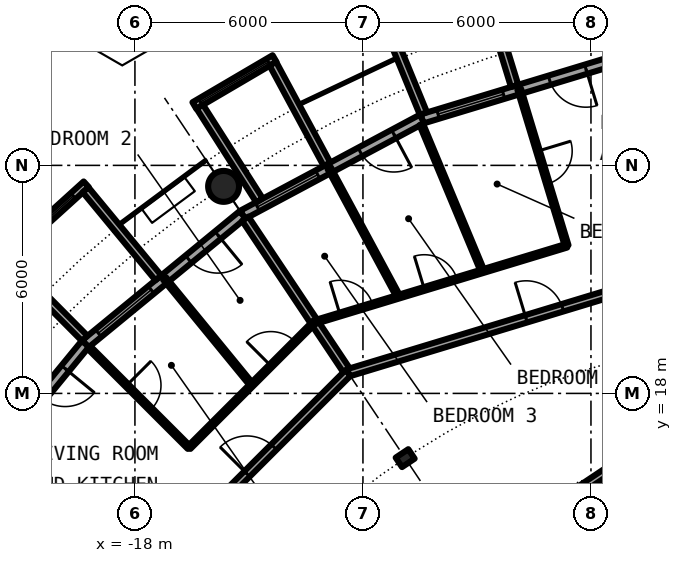
"""IFC4 building model, lengths in metres.
Left out: names, types, materials, properties, quantities, classifications, styles, units other than length and angle.
Written with IfcOpenShell. Run it as: python <this file> out.ifc"""

import sys

from ifc_helpers import new_model, si_unit, direction, frame, frame_2d, origin, origin_2d, place, context, subcontext, project, spatial, rectangle, circle, hollow_circle, i_section, extrude, element, fill, save


model = new_model("IFC4")
c1 = context("Model", 3, precision=1e-05, world=origin(), true_north=direction((0.0, 1.0)))
c2 = subcontext(c1, "Body", "Model", "MODEL_VIEW")
j1 = project(units=[si_unit("LENGTHUNIT", "METRE"), si_unit("PLANEANGLEUNIT", "RADIAN")], contexts=[c1])
p1 = place(None, origin())
s1 = spatial("IfcSite", under=j1, at=p1, CompositionType="ELEMENT")
p2 = place(p1, origin())
s2 = spatial("IfcBuilding", under=s1, at=p2, CompositionType="ELEMENT")
p3 = place(p2, frame((0.0, 0.0, 196.3)))
s3 = spatial("IfcBuildingStorey", under=s2, at=p3, CompositionType="ELEMENT", Elevation=196.3)
p4 = place(p3, frame((-15.667, 23.448, 0.0), z_axis=(0.0, 0.0, 1.0), x_axis=(1.0, 0.0, 0.0)))
e1 = element("IfcColumn", 1, at=p4, inside=s3, PredefinedType="COLUMN", context=c2, shape_type="SweptSolid", body=[
    extrude(hollow_circle(Radius=0.406, WallThickness=0.03, at=origin_2d()), origin(), (0.0, 0.0, 1.0), 3.05),
])
p5 = place(p3, frame((-10.889, 16.297, 0.0), z_axis=(0.0, 0.0, 1.0), x_axis=(-0.55557023302, 0.831469612303, 0.0)))
e2 = element("IfcColumn", 2, at=p5, inside=s3, PredefinedType="COLUMN", context=c2, shape_type="SweptSolid", body=[
    extrude(i_section(OverallWidth=0.3, OverallDepth=0.4, WebThickness=0.013, FlangeThickness=0.024, FilletRadius=0.027, at=origin_2d()), origin(), (0.0, 0.0, 1.0), 3.05),
])
p6 = place(p3, frame((-5.326, 26.775, 0.0), z_axis=(0.0, 0.0, 1.0), x_axis=(-0.956965678721, -0.290201119486, 0.0)))
e3 = element("IfcWall", 3, at=p6, inside=s3, PredefinedType="SOLIDWALL", context=c2, shape_type="SweptSolid", body=[
    extrude(rectangle(XDim=5.351, YDim=0.25, at=frame_2d((2.676, 0.0))), origin(), (0.0, 0.0, 1.0), 2.7),
])
p7 = place(p6, frame((0.841, 0.0, 0.0)))
e4 = element("IfcOpeningElement", 4, at=p7, cuts=e3, PredefinedType="OPENING", context=c2, shape_type="SweptSolid", body=[
    extrude(rectangle(XDim=1.0, YDim=2.2, at=frame_2d((0.5, 1.1))), frame((0.0, 0.135, 0.0), z_axis=(0.0, -1.0, 0.0), x_axis=(1.0, 0.0, 0.0)), (0.0, 0.0, 1.0), 0.27),
])
p8 = place(p6, frame((3.111, 0.0, 0.3)))
e5 = element("IfcOpeningElement", 5, at=p8, cuts=e3, PredefinedType="OPENING", context=c2, shape_type="SweptSolid", body=[
    extrude(rectangle(XDim=1.8, YDim=2.1, at=frame_2d((0.9, 1.05))), frame((0.0, 0.135, 0.0), z_axis=(0.0, -1.0, 0.0), x_axis=(1.0, 0.0, 0.0)), (0.0, 0.0, 1.0), 0.27),
])
p9 = place(p3, frame((-8.009, 26.092, -0.03), z_axis=(0.0, 0.0, 1.0), x_axis=(-0.293406695073, 0.955987715029, 0.0)))
e6 = element("IfcWall", 6, at=p9, inside=s3, PredefinedType="SOLIDWALL", context=c2, shape_type="SweptSolid", body=[
    extrude(rectangle(XDim=3.006, YDim=0.2, at=frame_2d((1.503, 0.0))), origin(), (0.0, 0.0, 1.0), 2.73),
])
p10 = place(p3, frame((-10.409, 25.364, -0.03), z_axis=(0.0, 0.0, 1.0), x_axis=(-0.379509886562, 0.925187681501, 0.0)))
e7 = element("IfcWall", 7, at=p10, inside=s3, PredefinedType="SOLIDWALL", context=c2, shape_type="SweptSolid", body=[
    extrude(rectangle(XDim=2.883, YDim=0.2, at=frame_2d((1.441, 0.0))), origin(), (0.0, 0.0, 1.0), 2.73),
])
p11 = place(p3, frame((-10.447, 25.222, 0.0), z_axis=(0.0, 0.0, 1.0), x_axis=(-0.881915646801, -0.471407246368, 0.0)))
e8 = element("IfcWall", 8, at=p11, inside=s3, PredefinedType="SOLIDWALL", context=c2, shape_type="SweptSolid", body=[
    extrude(rectangle(XDim=5.352, YDim=0.25, at=frame_2d((2.676, 0.0))), origin(), (0.0, 0.0, 1.0), 2.7),
])
p12 = place(p11, frame((0.841, 0.0, 0.0)))
e9 = element("IfcOpeningElement", 9, at=p12, cuts=e8, PredefinedType="OPENING", context=c2, shape_type="SweptSolid", body=[
    extrude(rectangle(XDim=1.0, YDim=2.2, at=frame_2d((0.5, 1.1))), frame((0.0, 0.135, 0.0), z_axis=(0.0, -1.0, 0.0), x_axis=(1.0, 0.0, 0.0)), (0.0, 0.0, 1.0), 0.27),
])
p13 = place(p11, frame((3.111, 0.0, 0.3)))
e10 = element("IfcOpeningElement", 10, at=p13, cuts=e8, PredefinedType="OPENING", context=c2, shape_type="SweptSolid", body=[
    extrude(rectangle(XDim=1.8, YDim=2.1, at=frame_2d((0.9, 1.05))), frame((0.0, 0.135, 0.0), z_axis=(0.0, -1.0, 0.0), x_axis=(1.0, 0.0, 0.0)), (0.0, 0.0, 1.0), 0.27),
])
p14 = place(p3, frame((-14.327, 26.812, -0.03), z_axis=(0.0, 0.0, 1.0), x_axis=(-0.862403467503, -0.506221551535, 0.0)))
e11 = element("IfcWall", 11, at=p14, inside=s3, PredefinedType="SOLIDWALL", context=c2, shape_type="SweptSolid", body=[
    extrude(rectangle(XDim=2.446, YDim=0.2, at=frame_2d((1.223, 0.0))), origin(), (0.0, 0.0, 1.0), 2.73),
])
p15 = place(p14, frame((0.183, 0.0, 0.33)))
e12 = element("IfcOpeningElement", 12, at=p15, cuts=e11, PredefinedType="OPENING", context=c2, shape_type="SweptSolid", body=[
    extrude(circle(Radius=1.04, at=frame_2d((1.04, 1.04))), frame((0.0, 0.11, 0.0), z_axis=(0.0, -1.0, 0.0), x_axis=(1.0, 0.0, 0.0)), (0.0, 0.0, 1.0), 0.22),
])
p16 = place(p3, frame((-12.945, 24.029, -0.03), z_axis=(0.0, 0.0, 1.0), x_axis=(-0.474424310775, 0.88029629861, 0.0)))
e13 = element("IfcWall", 13, at=p16, inside=s3, PredefinedType="SOLIDWALL", context=c2, shape_type="SweptSolid", body=[
    extrude(rectangle(XDim=3.006, YDim=0.2, at=frame_2d((1.503, 0.0))), origin(), (0.0, 0.0, 1.0), 2.73),
])
p17 = place(p3, frame((-14.722, 23.079, -0.03), z_axis=(0.0, 0.0, 1.0), x_axis=(-0.537572179146, 0.843217737129, 0.0)))
e14 = element("IfcWall", 14, at=p17, inside=s3, PredefinedType="SOLIDWALL", context=c2, shape_type="SweptSolid", body=[
    extrude(rectangle(XDim=2.924, YDim=0.2, at=frame_2d((1.462, 0.0))), origin(), (0.0, 0.0, 1.0), 2.73),
])
p18 = place(p3, frame((-15.167, 22.699, 0.0), z_axis=(0.0, 0.0, 1.0), x_axis=(-0.773019449054, -0.634382322723, 0.0)))
e15 = element("IfcWall", 15, at=p18, inside=s3, PredefinedType="SOLIDWALL", context=c2, shape_type="SweptSolid", body=[
    extrude(rectangle(XDim=5.352, YDim=0.25, at=frame_2d((2.676, 0.0))), origin(), (0.0, 0.0, 1.0), 2.7),
])
p19 = place(p18, frame((0.841, 0.0, 0.0)))
e16 = element("IfcOpeningElement", 16, at=p19, cuts=e15, PredefinedType="OPENING", context=c2, shape_type="SweptSolid", body=[
    extrude(rectangle(XDim=1.0, YDim=2.2, at=frame_2d((0.5, 1.1))), frame((0.0, 0.135, 0.0), z_axis=(0.0, -1.0, 0.0), x_axis=(1.0, 0.0, 0.0)), (0.0, 0.0, 1.0), 0.27),
])
p20 = place(p18, frame((3.111, 0.0, 0.3)))
e17 = element("IfcOpeningElement", 17, at=p20, cuts=e15, PredefinedType="OPENING", context=c2, shape_type="SweptSolid", body=[
    extrude(rectangle(XDim=1.8, YDim=2.1, at=frame_2d((0.9, 1.05))), frame((0.0, 0.135, 0.0), z_axis=(0.0, -1.0, 0.0), x_axis=(1.0, 0.0, 0.0)), (0.0, 0.0, 1.0), 0.27),
])
p21 = place(p3, frame((-19.282, 23.503, -0.03), z_axis=(0.0, 0.0, 1.0), x_axis=(-0.740998365753, -0.671506829416, 0.0)))
e18 = element("IfcWall", 18, at=p21, inside=s3, PredefinedType="SOLIDWALL", context=c2, shape_type="SweptSolid", body=[
    extrude(rectangle(XDim=2.993, YDim=0.2, at=frame_2d((1.497, 0.0))), origin(), (0.0, 0.0, 1.0), 2.73),
])
p22 = place(p21, frame((0.457, 0.0, 0.33)))
e19 = element("IfcOpeningElement", 19, at=p22, cuts=e18, PredefinedType="OPENING", context=c2, shape_type="SweptSolid", body=[
    extrude(circle(Radius=1.04, at=frame_2d((1.04, 1.04))), frame((0.0, 0.11, 0.0), z_axis=(0.0, -1.0, 0.0), x_axis=(1.0, 0.0, 0.0)), (0.0, 0.0, 1.0), 0.22),
])
p23 = place(p3, frame((-17.384, 21.041, -0.03), z_axis=(0.0, 0.0, 1.0), x_axis=(-0.63709551667, 0.770784861449, 0.0)))
e20 = element("IfcWall", 20, at=p23, inside=s3, PredefinedType="SOLIDWALL", context=c2, shape_type="SweptSolid", body=[
    extrude(rectangle(XDim=3.006, YDim=0.2, at=frame_2d((1.503, 0.0))), origin(), (0.0, 0.0, 1.0), 2.73),
])
p24 = place(p3, frame((-19.323, 19.45, -0.03), z_axis=(0.0, 0.0, 1.0), x_axis=(-0.704476739375, 0.709727076896, 0.0)))
e21 = element("IfcWall", 21, at=p24, inside=s3, PredefinedType="SOLIDWALL", context=c2, shape_type="SweptSolid", body=[
    extrude(rectangle(XDim=2.883, YDim=0.2, at=frame_2d((1.441, 0.0))), origin(), (0.0, 0.0, 1.0), 2.73),
])
p25 = place(p3, frame((-19.304, 19.304, 0.0), z_axis=(0.0, 0.0, 1.0), x_axis=(-0.634382322723, -0.773019449054, 0.0)))
e22 = element("IfcWall", 22, at=p25, inside=s3, PredefinedType="SOLIDWALL", context=c2, shape_type="SweptSolid", body=[
    extrude(rectangle(XDim=5.352, YDim=0.25, at=frame_2d((2.676, 0.0))), origin(), (0.0, 0.0, 1.0), 2.7),
])
p26 = place(p25, frame((0.841, 0.0, 0.0)))
e23 = element("IfcOpeningElement", 23, at=p26, cuts=e22, PredefinedType="OPENING", context=c2, shape_type="SweptSolid", body=[
    extrude(rectangle(XDim=1.0, YDim=2.2, at=frame_2d((0.5, 1.1))), frame((0.0, 0.135, 0.0), z_axis=(0.0, -1.0, 0.0), x_axis=(1.0, 0.0, 0.0)), (0.0, 0.0, 1.0), 0.27),
])
p27 = place(p25, frame((3.111, 0.0, 0.3)))
e24 = element("IfcOpeningElement", 24, at=p27, cuts=e22, PredefinedType="OPENING", context=c2, shape_type="SweptSolid", body=[
    extrude(rectangle(XDim=1.8, YDim=2.1, at=frame_2d((0.9, 1.05))), frame((0.0, 0.135, 0.0), z_axis=(0.0, -1.0, 0.0), x_axis=(1.0, 0.0, 0.0)), (0.0, 0.0, 1.0), 0.27),
])
p28 = place(p3, frame((-19.216, 19.216, 0.0), z_axis=(0.0, 0.0, 1.0), x_axis=(0.707106781187, -0.707106781187, 0.0)))
e25 = element("IfcWall", 25, at=p28, inside=s3, PredefinedType="PARTITIONING", context=c2, shape_type="SweptSolid", body=[
    extrude(rectangle(XDim=3.735, YDim=0.1, at=frame_2d((1.868, 0.0))), origin(), (0.0, 0.0, 1.0), 2.7),
])
p29 = place(p28, frame((1.417, 0.0, 0.0)))
e26 = element("IfcOpeningElement", 26, at=p29, cuts=e25, PredefinedType="OPENING", context=c2, shape_type="SweptSolid", body=[
    extrude(rectangle(XDim=0.9, YDim=2.3, at=frame_2d((0.45, 1.15))), frame((0.0, 0.06, 0.0), z_axis=(0.0, -1.0, 0.0), x_axis=(1.0, 0.0, 0.0)), (0.0, 0.0, 1.0), 0.12),
])
p30 = place(p3, frame((-17.22, 21.023, 0.0), z_axis=(0.0, 0.0, 1.0), x_axis=(0.633737383709, -0.773548271597, 0.0)))
e27 = element("IfcWall", 27, at=p30, inside=s3, PredefinedType="PARTITIONING", context=c2, shape_type="SweptSolid", body=[
    extrude(rectangle(XDim=3.618, YDim=0.1, at=frame_2d((1.809, 0.0))), origin(), (0.0, 0.0, 1.0), 2.7),
])
p31 = place(p3, frame((-15.097, 22.596, 0.0), z_axis=(0.0, 0.0, 1.0), x_axis=(0.555462686211, -0.831541462723, 0.0)))
e28 = element("IfcWall", 28, at=p31, inside=s3, PredefinedType="PARTITIONING", context=c2, shape_type="SweptSolid", body=[
    extrude(rectangle(XDim=4.875, YDim=0.2, at=frame_2d((2.438, 0.0))), origin(), (0.0, 0.0, 1.0), 2.7),
])
p32 = place(p3, frame((-12.887, 23.925, 0.0), z_axis=(0.0, 0.0, 1.0), x_axis=(0.474281720599, -0.88037313084, 0.0)))
e29 = element("IfcWall", 29, at=p32, inside=s3, PredefinedType="PARTITIONING", context=c2, shape_type="SweptSolid", body=[
    extrude(rectangle(XDim=3.842, YDim=0.1, at=frame_2d((1.921, 0.0))), origin(), (0.0, 0.0, 1.0), 2.7),
])
p33 = place(p3, frame((-10.465, 25.079, 0.0), z_axis=(0.0, 0.0, 1.0), x_axis=(0.385232176411, -0.922819684585, 0.0)))
e30 = element("IfcWall", 30, at=p33, inside=s3, PredefinedType="PARTITIONING", context=c2, shape_type="SweptSolid", body=[
    extrude(rectangle(XDim=4.187, YDim=0.1, at=frame_2d((2.094, 0.0))), origin(), (0.0, 0.0, 1.0), 2.7),
])
p34 = place(p3, frame((-7.888, 26.005, 0.0), z_axis=(0.0, 0.0, 1.0), x_axis=(0.290193157742, -0.956968093094, 0.0)))
e31 = element("IfcWall", 31, at=p34, inside=s3, PredefinedType="PARTITIONING", context=c2, shape_type="SweptSolid", body=[
    extrude(rectangle(XDim=4.304, YDim=0.1, at=frame_2d((2.152, 0.0))), origin(), (0.0, 0.0, 1.0), 2.7),
])
p35 = place(p34, frame((1.702, 0.0, 0.0)))
e32 = element("IfcOpeningElement", 32, at=p35, cuts=e31, PredefinedType="OPENING", context=c2, shape_type="SweptSolid", body=[
    extrude(rectangle(XDim=0.9, YDim=2.3, at=frame_2d((0.45, 1.15))), frame((0.0, 0.06, 0.0), z_axis=(0.0, -1.0, 0.0), x_axis=(1.0, 0.0, 0.0)), (0.0, 0.0, 1.0), 0.12),
])
p36 = place(p3, frame((-14.718, 9.832, 0.0), z_axis=(0.0, 0.0, 1.0), x_axis=(0.831437137577, 0.555618831806, 0.0)))
e33 = element("IfcWall", 33, at=p36, inside=s3, PredefinedType="PARTITIONING", context=c2, shape_type="SweptSolid", body=[
    extrude(rectangle(XDim=13.549, YDim=0.2, at=frame_2d((6.774, 0.0))), origin(), (0.0, 0.0, 1.0), 2.7),
])
p37 = place(p36, frame((7.968, 0.0, 0.0)))
e34 = element("IfcOpeningElement", 34, at=p37, cuts=e33, PredefinedType="OPENING", context=c2, shape_type="SweptSolid", body=[
    extrude(rectangle(XDim=1.0, YDim=2.3, at=frame_2d((0.5, 1.15))), frame((0.0, 0.11, 0.0), z_axis=(0.0, -1.0, 0.0), x_axis=(1.0, 0.0, 0.0)), (0.0, 0.0, 1.0), 0.22),
])
p38 = place(p3, frame((-12.389, 18.542, 0.0), z_axis=(0.0, 0.0, 1.0), x_axis=(0.956942051091, 0.290279022415, 0.0)))
e35 = element("IfcWall", 35, at=p38, inside=s3, PredefinedType="PARTITIONING", context=c2, shape_type="SweptSolid", body=[
    extrude(rectangle(XDim=12.946, YDim=0.2, at=frame_2d((6.473, 0.0))), origin(), (0.0, 0.0, 1.0), 2.7),
])
p39 = place(p38, frame((4.895, 0.0, 0.0)))
e36 = element("IfcOpeningElement", 36, at=p39, cuts=e35, PredefinedType="OPENING", context=c2, shape_type="SweptSolid", body=[
    extrude(rectangle(XDim=1.0, YDim=2.3, at=frame_2d((0.5, 1.15))), frame((0.0, 0.11, 0.0), z_axis=(0.0, -1.0, 0.0), x_axis=(1.0, 0.0, 0.0)), (0.0, 0.0, 1.0), 0.22),
])
p40 = place(p3, frame((-18.542, 12.389, 0.0), z_axis=(0.0, 0.0, 1.0), x_axis=(0.707106781187, 0.707106781187, 0.0)))
e37 = element("IfcWall", 37, at=p40, inside=s3, PredefinedType="PARTITIONING", context=c2, shape_type="SweptSolid", body=[
    extrude(rectangle(XDim=8.702, YDim=0.2, at=frame_2d((4.351, 0.0))), origin(), (0.0, 0.0, 1.0), 2.7),
])
p41 = place(p40, frame((4.938, 0.0, 0.0)))
e38 = element("IfcOpeningElement", 38, at=p41, cuts=e37, PredefinedType="OPENING", context=c2, shape_type="SweptSolid", body=[
    extrude(rectangle(XDim=1.0, YDim=2.3, at=frame_2d((0.5, 1.15))), frame((0.0, 0.11, 0.0), z_axis=(0.0, -1.0, 0.0), x_axis=(1.0, 0.0, 0.0)), (0.0, 0.0, 1.0), 0.22),
])
p42 = place(p3, frame((-13.281, 19.871, 0.0), z_axis=(0.0, 0.0, 1.0), x_axis=(0.956938868877, 0.290289512785, 0.0)))
e39 = element("IfcWall", 39, at=p42, inside=s3, PredefinedType="PARTITIONING", context=c2, shape_type="SweptSolid", body=[
    extrude(rectangle(XDim=6.941, YDim=0.1, at=frame_2d((3.47, 0.0))), origin(), (0.0, 0.0, 1.0), 2.7),
])
p43 = place(p42, frame((3.025, 0.0, 0.0)))
e40 = element("IfcOpeningElement", 40, at=p43, cuts=e39, PredefinedType="OPENING", context=c2, shape_type="SweptSolid", body=[
    extrude(rectangle(XDim=0.9, YDim=2.3, at=frame_2d((0.45, 1.15))), frame((0.0, 0.06, 0.0), z_axis=(0.0, -1.0, 0.0), x_axis=(1.0, 0.0, 0.0)), (0.0, 0.0, 1.0), 0.12),
])
p44 = place(p42, frame((0.708, 0.0, 0.0)))
e41 = element("IfcOpeningElement", 41, at=p44, cuts=e39, PredefinedType="OPENING", context=c2, shape_type="SweptSolid", body=[
    extrude(rectangle(XDim=0.9, YDim=2.3, at=frame_2d((0.45, 1.15))), frame((0.0, 0.06, 0.0), z_axis=(0.0, -1.0, 0.0), x_axis=(1.0, 0.0, 0.0)), (0.0, 0.0, 1.0), 0.12),
])
p45 = place(p3, frame((-16.575, 16.575, 0.0), z_axis=(0.0, 0.0, 1.0), x_axis=(0.707080600289, 0.707132961115, 0.0)))
e42 = element("IfcWall", 42, at=p45, inside=s3, PredefinedType="PARTITIONING", context=c2, shape_type="SweptSolid", body=[
    extrude(rectangle(XDim=4.663, YDim=0.1, at=frame_2d((2.331, 0.0))), origin(), (0.0, 0.0, 1.0), 2.7),
])
p46 = place(p45, frame((3.043, 0.0, 0.0)))
e43 = element("IfcOpeningElement", 43, at=p46, cuts=e42, PredefinedType="OPENING", context=c2, shape_type="SweptSolid", body=[
    extrude(rectangle(XDim=0.9, YDim=2.3, at=frame_2d((0.45, 1.15))), frame((0.0, 0.06, 0.0), z_axis=(0.0, -1.0, 0.0), x_axis=(1.0, 0.0, 0.0)), (0.0, 0.0, 1.0), 0.12),
])
p47 = place(p7, origin())
e44 = element("IfcDoor", 44, at=p47, inside=s3, OperationType="SINGLE_SWING_LEFT", PredefinedType="DOOR", context=c2, shape_type="SweptSolid", body=[
    extrude(rectangle(XDim=1.0, YDim=2.2, at=frame_2d((0.5, 1.1))), frame((0.0, 0.025, 0.0), z_axis=(0.0, -1.0, 0.0), x_axis=(1.0, 0.0, 0.0)), (0.0, 0.0, 1.0), 0.05),
])
fill(e4, e44)
p48 = place(p8, origin())
e45 = element("IfcWindow", 45, at=p48, inside=s3, PartitioningType="SINGLE_PANEL", PredefinedType="WINDOW", context=c2, shape_type="SweptSolid", body=[
    extrude(rectangle(XDim=1.8, YDim=2.1, at=frame_2d((0.9, 1.05))), frame((0.0, 0.03, 0.0), z_axis=(0.0, -1.0, 0.0), x_axis=(1.0, 0.0, 0.0)), (0.0, 0.0, 1.0), 0.06),
])
fill(e5, e45)
p49 = place(p12, origin())
e46 = element("IfcDoor", 46, at=p49, inside=s3, OperationType="SINGLE_SWING_LEFT", PredefinedType="DOOR", context=c2, shape_type="SweptSolid", body=[
    extrude(rectangle(XDim=1.0, YDim=2.2, at=frame_2d((0.5, 1.1))), frame((0.0, 0.025, 0.0), z_axis=(0.0, -1.0, 0.0), x_axis=(1.0, 0.0, 0.0)), (0.0, 0.0, 1.0), 0.05),
])
fill(e9, e46)
p50 = place(p13, origin())
e47 = element("IfcWindow", 47, at=p50, inside=s3, PartitioningType="SINGLE_PANEL", PredefinedType="WINDOW", context=c2, shape_type="SweptSolid", body=[
    extrude(rectangle(XDim=1.8, YDim=2.1, at=frame_2d((0.9, 1.05))), frame((0.0, 0.03, 0.0), z_axis=(0.0, -1.0, 0.0), x_axis=(1.0, 0.0, 0.0)), (0.0, 0.0, 1.0), 0.06),
])
fill(e10, e47)
p51 = place(p15, origin())
e48 = element("IfcWindow", 48, at=p51, inside=s3, PartitioningType="SINGLE_PANEL", PredefinedType="WINDOW", context=c2, shape_type="SweptSolid", body=[
    extrude(circle(Radius=1.04, at=frame_2d((1.04, 1.04))), frame((0.0, 0.03, 0.0), z_axis=(0.0, -1.0, 0.0), x_axis=(1.0, 0.0, 0.0)), (0.0, 0.0, 1.0), 0.06),
])
fill(e12, e48)
p52 = place(p19, origin())
e49 = element("IfcDoor", 49, at=p52, inside=s3, OperationType="SINGLE_SWING_LEFT", PredefinedType="DOOR", context=c2, shape_type="SweptSolid", body=[
    extrude(rectangle(XDim=1.0, YDim=2.2, at=frame_2d((0.5, 1.1))), frame((0.0, 0.025, 0.0), z_axis=(0.0, -1.0, 0.0), x_axis=(1.0, 0.0, 0.0)), (0.0, 0.0, 1.0), 0.05),
])
fill(e16, e49)
p53 = place(p20, origin())
e50 = element("IfcWindow", 50, at=p53, inside=s3, PartitioningType="SINGLE_PANEL", PredefinedType="WINDOW", context=c2, shape_type="SweptSolid", body=[
    extrude(rectangle(XDim=1.8, YDim=2.1, at=frame_2d((0.9, 1.05))), frame((0.0, 0.03, 0.0), z_axis=(0.0, -1.0, 0.0), x_axis=(1.0, 0.0, 0.0)), (0.0, 0.0, 1.0), 0.06),
])
fill(e17, e50)
p54 = place(p22, origin())
e51 = element("IfcWindow", 51, at=p54, inside=s3, PartitioningType="SINGLE_PANEL", PredefinedType="WINDOW", context=c2, shape_type="SweptSolid", body=[
    extrude(circle(Radius=1.04, at=frame_2d((1.04, 1.04))), frame((0.0, 0.03, 0.0), z_axis=(0.0, -1.0, 0.0), x_axis=(1.0, 0.0, 0.0)), (0.0, 0.0, 1.0), 0.06),
])
fill(e19, e51)
p55 = place(p26, origin())
e52 = element("IfcDoor", 52, at=p55, inside=s3, OperationType="SINGLE_SWING_LEFT", PredefinedType="DOOR", context=c2, shape_type="SweptSolid", body=[
    extrude(rectangle(XDim=1.0, YDim=2.2, at=frame_2d((0.5, 1.1))), frame((0.0, 0.025, 0.0), z_axis=(0.0, -1.0, 0.0), x_axis=(1.0, 0.0, 0.0)), (0.0, 0.0, 1.0), 0.05),
])
fill(e23, e52)
p56 = place(p39, origin())
e53 = element("IfcDoor", 53, at=p56, inside=s3, OperationType="SINGLE_SWING_LEFT", PredefinedType="DOOR", context=c2, shape_type="SweptSolid", body=[
    extrude(rectangle(XDim=1.0, YDim=2.3, at=frame_2d((0.5, 1.15))), frame((0.0, 0.025, 0.0), z_axis=(0.0, -1.0, 0.0), x_axis=(1.0, 0.0, 0.0)), (0.0, 0.0, 1.0), 0.05),
])
fill(e36, e53)
p57 = place(p35, origin())
e54 = element("IfcDoor", 54, at=p57, inside=s3, OperationType="SINGLE_SWING_LEFT", PredefinedType="DOOR", context=c2, shape_type="SweptSolid", body=[
    extrude(rectangle(XDim=0.9, YDim=2.3, at=frame_2d((0.45, 1.15))), frame((0.0, 0.025, 0.0), z_axis=(0.0, -1.0, 0.0), x_axis=(1.0, 0.0, 0.0)), (0.0, 0.0, 1.0), 0.05),
])
fill(e32, e54)
p58 = place(p43, origin())
e55 = element("IfcDoor", 55, at=p58, inside=s3, OperationType="SINGLE_SWING_RIGHT", PredefinedType="DOOR", context=c2, shape_type="SweptSolid", body=[
    extrude(rectangle(XDim=0.9, YDim=2.3, at=frame_2d((0.45, 1.15))), frame((0.0, 0.025, 0.0), z_axis=(0.0, -1.0, 0.0), x_axis=(1.0, 0.0, 0.0)), (0.0, 0.0, 1.0), 0.05),
])
fill(e40, e55)
p59 = place(p44, origin())
e56 = element("IfcDoor", 56, at=p59, inside=s3, OperationType="SINGLE_SWING_LEFT", PredefinedType="DOOR", context=c2, shape_type="SweptSolid", body=[
    extrude(rectangle(XDim=0.9, YDim=2.3, at=frame_2d((0.45, 1.15))), frame((0.0, 0.025, 0.0), z_axis=(0.0, -1.0, 0.0), x_axis=(1.0, 0.0, 0.0)), (0.0, 0.0, 1.0), 0.05),
])
fill(e41, e56)
p60 = place(p41, origin())
e57 = element("IfcDoor", 57, at=p60, inside=s3, OperationType="SINGLE_SWING_RIGHT", PredefinedType="DOOR", context=c2, shape_type="SweptSolid", body=[
    extrude(rectangle(XDim=1.0, YDim=2.3, at=frame_2d((0.5, 1.15))), frame((0.0, 0.025, 0.0), z_axis=(0.0, -1.0, 0.0), x_axis=(1.0, 0.0, 0.0)), (0.0, 0.0, 1.0), 0.05),
])
fill(e38, e57)
p61 = place(p29, origin())
e58 = element("IfcDoor", 58, at=p61, inside=s3, OperationType="SINGLE_SWING_LEFT", PredefinedType="DOOR", context=c2, shape_type="SweptSolid", body=[
    extrude(rectangle(XDim=0.9, YDim=2.3, at=frame_2d((0.45, 1.15))), frame((0.0, 0.025, 0.0), z_axis=(0.0, -1.0, 0.0), x_axis=(1.0, 0.0, 0.0)), (0.0, 0.0, 1.0), 0.05),
])
fill(e26, e58)
p62 = place(p46, origin())
e59 = element("IfcDoor", 59, at=p62, inside=s3, OperationType="SINGLE_SWING_RIGHT", PredefinedType="DOOR", context=c2, shape_type="SweptSolid", body=[
    extrude(rectangle(XDim=0.9, YDim=2.3, at=frame_2d((0.45, 1.15))), frame((0.0, 0.025, 0.0), z_axis=(0.0, -1.0, 0.0), x_axis=(1.0, 0.0, 0.0)), (0.0, 0.0, 1.0), 0.05),
])
fill(e43, e59)
save(model, sys.argv[1])
